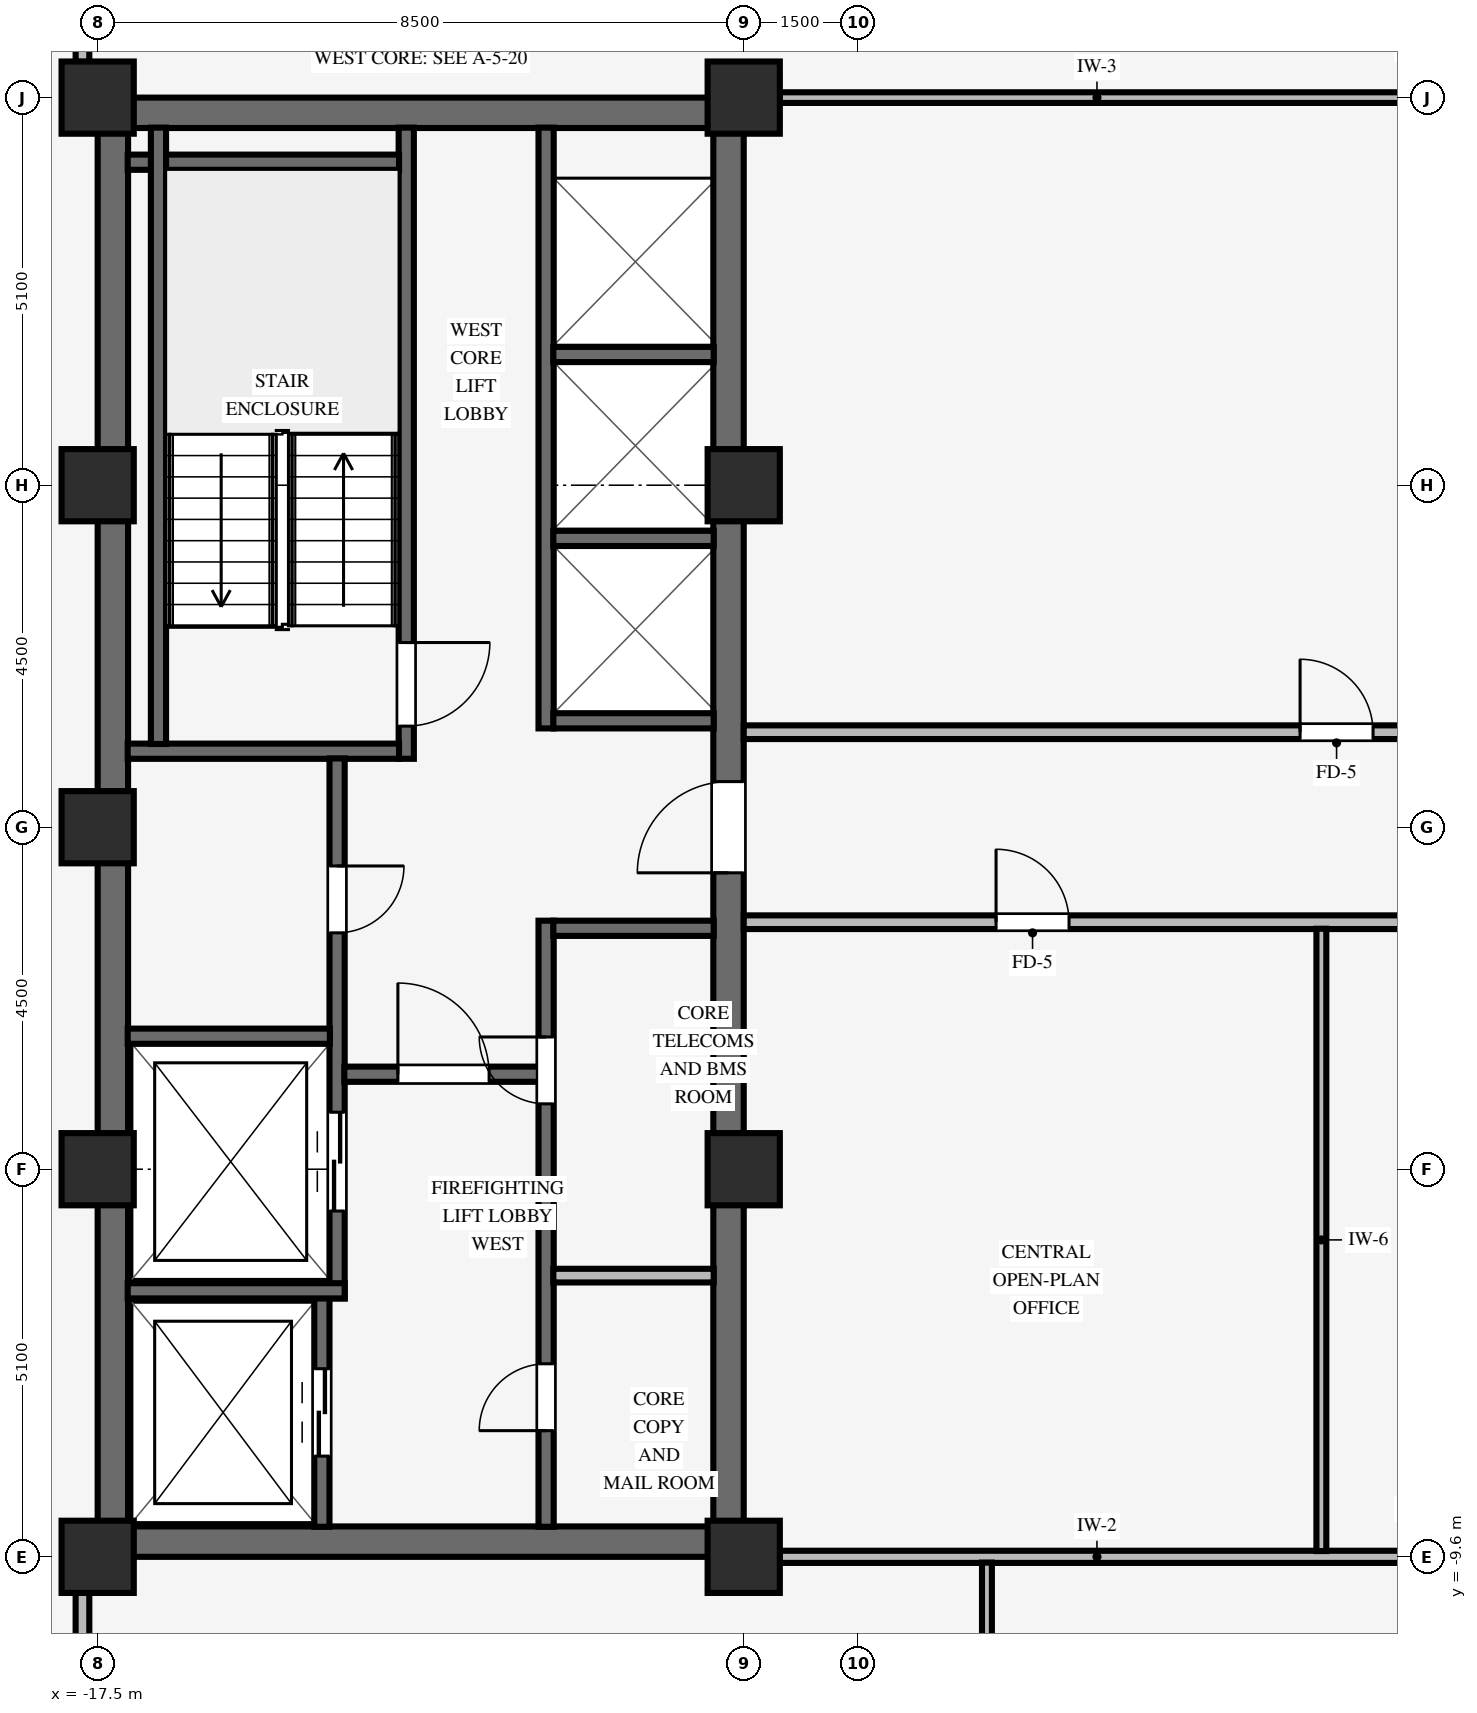
"""IFC4 building model, lengths in metres.
Left out: names, types, materials, properties, quantities, classifications, styles, units other than length and angle.
Written with IfcOpenShell. Run it as: python <this file> out.ifc"""

import sys

from ifc_helpers import new_model, si_unit, direction, frame, frame_2d, origin, origin_2d, place, context, subcontext, project, spatial, rectangle, extrude, source, transform, mapped, element, fill, save


model = new_model("IFC4")
c1 = context("Model", 3, precision=1e-05, world=origin(), true_north=direction((0.0, 1.0)))
c2 = subcontext(c1, "Body", "Model", "MODEL_VIEW")
j1 = project(units=[si_unit("LENGTHUNIT", "METRE"), si_unit("PLANEANGLEUNIT", "RADIAN")], contexts=[c1])
p1 = place(None, origin())
s1 = spatial("IfcSite", under=j1, at=p1, CompositionType="ELEMENT")
p2 = place(p1, origin())
s2 = spatial("IfcBuilding", under=s1, at=p2, CompositionType="ELEMENT")
p3 = place(p2, frame((0.0, 0.0, 149.4)))
s3 = spatial("IfcBuildingStorey", under=s2, at=p3, CompositionType="ELEMENT", Elevation=149.4)
for number, where, z_axis, x_axis in (
    (1, (-17.5, -9.4, 0.0), (0.0, 0.0, 1.0), (1.0, 0.0, 0.0)),
    (2, (-17.5, 9.4, 0.0), (0.0, 0.0, 1.0), (1.0, 0.0, 0.0)),
):
    element("IfcWall", number, at=place(p3, frame(where, z_axis=z_axis, x_axis=x_axis)), inside=s3, PredefinedType="SHEAR", context=c2, shape_type="SweptSolid", body=[
        extrude(rectangle(XDim=8.5, YDim=0.4, at=frame_2d((4.25, 0.0))), origin(), (0.0, 0.0, 1.0), 3.37),
    ])
p4 = place(p3, frame((-17.3, -9.205, 0.0), z_axis=(0.0, 0.0, 1.0), x_axis=(0.0, 1.0, 0.0)))
e3 = element("IfcWall", 3, at=p4, inside=s3, PredefinedType="SHEAR", context=c2, shape_type="SweptSolid", body=[
    extrude(rectangle(XDim=18.41, YDim=0.4, at=frame_2d((9.205, 0.0))), origin(), (0.0, 0.0, 1.0), 3.37),
])
p5 = place(p3, frame((-9.2, -9.205, 0.0), z_axis=(0.0, 0.0, 1.0), x_axis=(0.0, 1.0, 0.0)))
e4 = element("IfcWall", 4, at=p5, inside=s3, PredefinedType="SHEAR", context=c2, shape_type="SweptSolid", body=[
    extrude(rectangle(XDim=18.41, YDim=0.4, at=frame_2d((9.205, 0.0))), origin(), (0.0, 0.0, 1.0), 3.37),
])
p6 = place(p5, frame((8.605, 0.0, 0.0)))
e5 = element("IfcOpeningElement", 5, at=p6, cuts=e4, PredefinedType="OPENING", context=c2, shape_type="SweptSolid", body=[
    extrude(rectangle(XDim=1.2, YDim=2.15, at=frame_2d((0.6, 1.075))), frame((0.0, 0.21, 0.0), z_axis=(0.0, -1.0, 0.0), x_axis=(1.0, 0.0, 0.0)), (0.0, 0.0, 1.0), 0.42),
])
for number, where, z_axis, x_axis in (
    (6, (-17.5, -9.6, 0.0), (0.0, 0.0, 1.0), (1.0, 0.0, 0.0)),
    (7, (-17.5, -4.5, 0.0), (0.0, 0.0, 1.0), (1.0, 0.0, 0.0)),
    (8, (-17.5, 4.5, 0.0), (0.0, 0.0, 1.0), (1.0, 0.0, 0.0)),
    (9, (-17.5, 9.6, 0.0), (0.0, 0.0, 1.0), (1.0, 0.0, 0.0)),
    (10, (-9.0, -9.6, 0.0), (0.0, 0.0, 1.0), (1.0, 0.0, 0.0)),
    (11, (-9.0, -4.5, 0.0), (0.0, 0.0, 1.0), (1.0, 0.0, 0.0)),
    (12, (-9.0, 4.5, 0.0), (0.0, 0.0, 1.0), (1.0, 0.0, 0.0)),
    (13, (-9.0, 9.6, 0.0), (0.0, 0.0, 1.0), (1.0, 0.0, 0.0)),
    (14, (-17.5, 0.0, 0.0), (0.0, 0.0, 1.0), (1.0, 0.0, 0.0)),
):
    element("IfcColumn", number, at=place(p3, frame(where, z_axis=z_axis, x_axis=x_axis)), inside=s3, PredefinedType="COLUMN", context=c2, shape_type="SweptSolid", body=[
        extrude(rectangle(XDim=0.95, YDim=0.95, at=origin_2d()), origin(), (0.0, 0.0, 1.0), 3.37),
    ])
p7 = place(p3, frame((-13.44, 0.9, 0.0), z_axis=(0.0, 0.0, 1.0), x_axis=(0.0, 1.0, 0.0)))
e15 = element("IfcWall", 15, at=p7, inside=s3, PredefinedType="SHEAR", context=c2, shape_type="SweptSolid", body=[
    extrude(rectangle(XDim=8.305, YDim=0.2, at=frame_2d((4.153, 0.0))), origin(), (0.0, 0.0, 1.0), 3.37),
])
p8 = place(p7, frame((1.53, 0.0, 0.0), z_axis=(0.0, 0.0, 1.0), x_axis=(-1.0, 0.0, 0.0)))
e16 = element("IfcOpeningElement", 16, at=p8, cuts=e15, PredefinedType="OPENING", context=c2, shape_type="SweptSolid", body=[
    extrude(rectangle(XDim=1.1, YDim=2.15, at=frame_2d((0.55, 1.075))), frame((0.0, 0.11, 0.0), z_axis=(0.0, -1.0, 0.0), x_axis=(1.0, 0.0, 0.0)), (0.0, 0.0, 1.0), 0.22),
])
for number, where, z_axis, x_axis in (
    (17, (-17.105, 1.0, 0.0), (0.0, 0.0, 1.0), (1.0, 0.0, 0.0)),
    (18, (-17.105, 8.75, 0.0), (0.0, 0.0, 1.0), (1.0, 0.0, 0.0)),
):
    element("IfcWall", number, at=place(p3, frame(where, z_axis=z_axis, x_axis=x_axis)), inside=s3, PredefinedType="SHEAR", context=c2, shape_type="SweptSolid", body=[
        extrude(rectangle(XDim=3.57, YDim=0.2, at=frame_2d((1.785, 0.0))), origin(), (0.0, 0.0, 1.0), 3.37),
    ])
p9 = place(p3, frame((-16.7, 1.095, 0.0), z_axis=(0.0, 0.0, 1.0), x_axis=(0.0, 1.0, 0.0)))
e19 = element("IfcWall", 19, at=p9, inside=s3, PredefinedType="SHEAR", context=c2, shape_type="SweptSolid", body=[
    extrude(rectangle(XDim=8.11, YDim=0.2, at=frame_2d((4.055, 0.0))), origin(), (0.0, 0.0, 1.0), 3.37),
])
p10 = place(p3, frame((-14.55, -9.205, 0.0), z_axis=(0.0, 0.0, 1.0), x_axis=(0.0, 1.0, 0.0)))
e20 = element("IfcWall", 20, at=p10, inside=s3, PredefinedType="SHEAR", context=c2, shape_type="SweptSolid", body=[
    extrude(rectangle(XDim=3.01, YDim=0.2, at=frame_2d((1.505, 0.0))), origin(), (0.0, 0.0, 1.0), 3.37),
])
p11 = place(p10, frame((0.93, 0.0, 0.0)))
e21 = element("IfcOpeningElement", 21, at=p11, cuts=e20, PredefinedType="OPENING", context=c2, shape_type="SweptSolid", body=[
    extrude(rectangle(XDim=1.15, YDim=2.15, at=frame_2d((0.575, 1.075))), frame((0.0, 0.11, 0.0), z_axis=(0.0, -1.0, 0.0), x_axis=(1.0, 0.0, 0.0)), (0.0, 0.0, 1.0), 0.22),
])
p12 = place(p3, frame((-14.35, -6.2, 0.0), z_axis=(0.0, 0.0, 1.0), x_axis=(0.0, 1.0, 0.0)))
e22 = element("IfcWall", 22, at=p12, inside=s3, PredefinedType="SHEAR", context=c2, shape_type="SweptSolid", body=[
    extrude(rectangle(XDim=7.105, YDim=0.2, at=frame_2d((3.552, 0.0))), origin(), (0.0, 0.0, 1.0), 3.37),
])
p13 = place(p12, frame((5.69, 0.0, 0.0), z_axis=(0.0, 0.0, 1.0), x_axis=(-1.0, 0.0, 0.0)))
e23 = element("IfcOpeningElement", 23, at=p13, cuts=e22, PredefinedType="OPENING", context=c2, shape_type="SweptSolid", body=[
    extrude(rectangle(XDim=0.88, YDim=2.1, at=frame_2d((0.44, 1.05))), frame((0.0, 0.11, 0.0), z_axis=(0.0, -1.0, 0.0), x_axis=(1.0, 0.0, 0.0)), (0.0, 0.0, 1.0), 0.22),
])
p14 = place(p12, frame((1.15, 0.0, 0.0)))
e24 = element("IfcOpeningElement", 24, at=p14, cuts=e22, PredefinedType="OPENING", context=c2, shape_type="SweptSolid", body=[
    extrude(rectangle(XDim=1.3, YDim=2.2, at=frame_2d((0.65, 1.1))), frame((0.0, 0.11, 0.0), z_axis=(0.0, -1.0, 0.0), x_axis=(1.0, 0.0, 0.0)), (0.0, 0.0, 1.0), 0.22),
])
p15 = place(p3, frame((-17.105, -6.1, 0.0), z_axis=(0.0, 0.0, 1.0), x_axis=(1.0, 0.0, 0.0)))
e25 = element("IfcWall", 25, at=p15, inside=s3, PredefinedType="SHEAR", context=c2, shape_type="SweptSolid", body=[
    extrude(rectangle(XDim=2.855, YDim=0.2, at=frame_2d((1.427, 0.0))), origin(), (0.0, 0.0, 1.0), 3.37),
])
p16 = place(p3, frame((-17.105, -2.75, 0.0), z_axis=(0.0, 0.0, 1.0), x_axis=(1.0, 0.0, 0.0)))
e26 = element("IfcWall", 26, at=p16, inside=s3, PredefinedType="SHEAR", context=c2, shape_type="SweptSolid", body=[
    extrude(rectangle(XDim=2.66, YDim=0.2, at=frame_2d((1.33, 0.0))), origin(), (0.0, 0.0, 1.0), 3.37),
])
p17 = place(p3, frame((-11.6, -9.205, 0.0), z_axis=(0.0, 0.0, 1.0), x_axis=(0.0, 1.0, 0.0)))
e27 = element("IfcWall", 27, at=p17, inside=s3, PredefinedType="SHEAR", context=c2, shape_type="SweptSolid", body=[
    extrude(rectangle(XDim=7.975, YDim=0.2, at=frame_2d((3.988, 0.0))), origin(), (0.0, 0.0, 1.0), 3.37),
])
p18 = place(p17, frame((1.265, 0.0, 0.0)))
e28 = element("IfcOpeningElement", 28, at=p18, cuts=e27, PredefinedType="OPENING", context=c2, shape_type="SweptSolid", body=[
    extrude(rectangle(XDim=0.88, YDim=2.1, at=frame_2d((0.44, 1.05))), frame((0.0, 0.11, 0.0), z_axis=(0.0, -1.0, 0.0), x_axis=(1.0, 0.0, 0.0)), (0.0, 0.0, 1.0), 0.22),
])
p19 = place(p17, frame((5.565, 0.0, 0.0)))
e29 = element("IfcOpeningElement", 29, at=p19, cuts=e27, PredefinedType="OPENING", context=c2, shape_type="SweptSolid", body=[
    extrude(rectangle(XDim=0.88, YDim=2.1, at=frame_2d((0.44, 1.05))), frame((0.0, 0.11, 0.0), z_axis=(0.0, -1.0, 0.0), x_axis=(1.0, 0.0, 0.0)), (0.0, 0.0, 1.0), 0.22),
])
p20 = place(p3, frame((-14.255, -3.25, 0.0), z_axis=(0.0, 0.0, 1.0), x_axis=(1.0, 0.0, 0.0)))
e30 = element("IfcWall", 30, at=p20, inside=s3, PredefinedType="SHEAR", context=c2, shape_type="SweptSolid", body=[
    extrude(rectangle(XDim=2.56, YDim=0.2, at=frame_2d((1.28, 0.0))), origin(), (0.0, 0.0, 1.0), 3.37),
])
p21 = place(p20, frame((0.705, 0.0, 0.0)))
e31 = element("IfcOpeningElement", 31, at=p21, cuts=e30, PredefinedType="OPENING", context=c2, shape_type="SweptSolid", body=[
    extrude(rectangle(XDim=1.2, YDim=2.15, at=frame_2d((0.6, 1.075))), frame((0.0, 0.11, 0.0), z_axis=(0.0, -1.0, 0.0), x_axis=(1.0, 0.0, 0.0)), (0.0, 0.0, 1.0), 0.22),
])
p22 = place(p3, frame((-11.505, -1.33, 0.0), z_axis=(0.0, 0.0, 1.0), x_axis=(1.0, 0.0, 0.0)))
e32 = element("IfcWall", 32, at=p22, inside=s3, PredefinedType="SHEAR", context=c2, shape_type="SweptSolid", body=[
    extrude(rectangle(XDim=2.11, YDim=0.2, at=frame_2d((1.055, 0.0))), origin(), (0.0, 0.0, 1.0), 3.37),
])
p23 = place(p3, frame((-11.505, -5.9, 0.0), z_axis=(0.0, 0.0, 1.0), x_axis=(1.0, 0.0, 0.0)))
e33 = element("IfcWall", 33, at=p23, inside=s3, PredefinedType="PARTITIONING", context=c2, shape_type="SweptSolid", body=[
    extrude(rectangle(XDim=2.11, YDim=0.18, at=frame_2d((1.055, 0.0))), origin(), (0.0, 0.0, 1.0), 3.36),
])
p24 = place(p3, frame((-11.6, 1.3, 0.0), z_axis=(0.0, 0.0, 1.0), x_axis=(0.0, 1.0, 0.0)))
e34 = element("IfcWall", 34, at=p24, inside=s3, PredefinedType="SHEAR", context=c2, shape_type="SweptSolid", body=[
    extrude(rectangle(XDim=7.905, YDim=0.2, at=frame_2d((3.953, 0.0))), origin(), (0.0, 0.0, 1.0), 3.37),
])
for number, where, z_axis, x_axis in (
    (35, (-11.505, 1.4, 0.0), (0.0, 0.0, 1.0), (1.0, 0.0, 0.0)),
    (36, (-11.505, 3.8, 0.0), (0.0, 0.0, 1.0), (1.0, 0.0, 0.0)),
    (37, (-11.505, 6.22, 0.0), (0.0, 0.0, 1.0), (1.0, 0.0, 0.0)),
):
    element("IfcWall", number, at=place(p3, frame(where, z_axis=z_axis, x_axis=x_axis)), inside=s3, PredefinedType="SHEAR", context=c2, shape_type="SweptSolid", body=[
        extrude(rectangle(XDim=2.11, YDim=0.2, at=frame_2d((1.055, 0.0))), origin(), (0.0, 0.0, 1.0), 3.37),
    ])
p25 = place(p3, frame((-8.529, -9.6, 0.0), z_axis=(0.0, 0.0, 1.0), x_axis=(1.0, 0.0, 0.0)))
e38 = element("IfcWall", 38, at=p25, inside=s3, PredefinedType="PARTITIONING", context=c2, shape_type="SweptSolid", body=[
    extrude(rectangle(XDim=8.353, YDim=0.16, at=frame_2d((4.177, 0.0))), origin(), (0.0, 0.0, 1.0), 2.405),
])
p26 = place(p3, frame((-9.0, -1.25, 0.0), z_axis=(0.0, 0.0, 1.0), x_axis=(1.0, 0.0, 0.0)))
e39 = element("IfcWall", 39, at=p26, inside=s3, PredefinedType="PARTITIONING", context=c2, shape_type="SweptSolid", body=[
    extrude(rectangle(XDim=15.6, YDim=0.18, at=frame_2d((7.8, 0.0))), origin(), (0.0, 0.0, 1.0), 3.36),
])
p27 = place(p26, frame((3.32, 0.0, 0.0)))
e40 = element("IfcOpeningElement", 40, at=p27, cuts=e39, PredefinedType="OPENING", context=c2, shape_type="SweptSolid", body=[
    extrude(rectangle(XDim=0.96, YDim=2.1, at=frame_2d((0.48, 1.05))), frame((0.0, 0.1, 0.0), z_axis=(0.0, -1.0, 0.0), x_axis=(1.0, 0.0, 0.0)), (0.0, 0.0, 1.0), 0.2),
])
p28 = place(p3, frame((-9.0, 1.25, 0.0), z_axis=(0.0, 0.0, 1.0), x_axis=(1.0, 0.0, 0.0)))
e41 = element("IfcWall", 41, at=p28, inside=s3, PredefinedType="PARTITIONING", context=c2, shape_type="SweptSolid", body=[
    extrude(rectangle(XDim=15.6, YDim=0.18, at=frame_2d((7.8, 0.0))), origin(), (0.0, 0.0, 1.0), 3.36),
])
p29 = place(p28, frame((7.32, 0.0, 0.0)))
e42 = element("IfcOpeningElement", 42, at=p29, cuts=e41, PredefinedType="OPENING", context=c2, shape_type="SweptSolid", body=[
    extrude(rectangle(XDim=0.96, YDim=2.1, at=frame_2d((0.48, 1.05))), frame((0.0, 0.1, 0.0), z_axis=(0.0, -1.0, 0.0), x_axis=(1.0, 0.0, 0.0)), (0.0, 0.0, 1.0), 0.2),
])
p30 = place(p3, frame((-8.529, 9.6, 0.0), z_axis=(0.0, 0.0, 1.0), x_axis=(1.0, 0.0, 0.0)))
e43 = element("IfcWall", 43, at=p30, inside=s3, PredefinedType="PARTITIONING", context=c2, shape_type="SweptSolid", body=[
    extrude(rectangle(XDim=8.353, YDim=0.14, at=frame_2d((4.177, 0.0))), origin(), (0.0, 0.0, 1.0), 2.405),
])
for number, where, z_axis, x_axis in (
    (44, (-17.7, -13.414, 0.0), (0.0, 0.0, 1.0), (0.0, 1.0, 0.0)),
    (45, (-17.7, 10.071, 0.0), (0.0, 0.0, 1.0), (0.0, 1.0, 0.0)),
):
    element("IfcWall", number, at=place(p3, frame(where, z_axis=z_axis, x_axis=x_axis)), inside=s3, PredefinedType="PARTITIONING", context=c2, shape_type="SweptSolid", body=[
        extrude(rectangle(XDim=3.343, YDim=0.18, at=frame_2d((1.671, 0.0))), origin(), (0.0, 0.0, 1.0), 2.816),
    ])
p31 = place(p3, frame((-5.8, -13.414, 0.0), z_axis=(0.0, 0.0, 1.0), x_axis=(0.0, 1.0, 0.0)))
e46 = element("IfcWall", 46, at=p31, inside=s3, PredefinedType="PARTITIONING", context=c2, shape_type="SweptSolid", body=[
    extrude(rectangle(XDim=3.738, YDim=0.13, at=frame_2d((1.869, 0.0))), origin(), (0.0, 0.0, 1.0), 3.36),
])
p32 = place(p3, frame((-1.4, -9.524, 0.0), z_axis=(0.0, 0.0, 1.0), x_axis=(0.0, 1.0, 0.0)))
e47 = element("IfcWall", 47, at=p32, inside=s3, PredefinedType="PARTITIONING", context=c2, shape_type="SweptSolid", body=[
    extrude(rectangle(XDim=8.188, YDim=0.13, at=frame_2d((4.094, 0.0))), origin(), (0.0, 0.0, 1.0), 3.36),
])
m1 = source(origin(), c2, "Body", "SweptSolid", [
    extrude(rectangle(XDim=1.1, YDim=2.15, at=frame_2d((0.55, 1.075))), frame((0.0, 0.025, 0.0), z_axis=(0.0, -1.0, 0.0), x_axis=(1.0, 0.0, 0.0)), (0.0, 0.0, 1.0), 0.05),
])
p33 = place(p8, origin())
e48 = element("IfcDoor", 48, at=p33, inside=s3, OperationType="SINGLE_SWING_LEFT", PredefinedType="DOOR", context=c2, shape_type="MappedRepresentation", body=[
    mapped(m1, transform((0.0, 0.0, 0.0), scale=1.0)),
])
fill(e16, e48)
m2 = source(origin(), c2, "Body", "SweptSolid", [
    extrude(rectangle(XDim=0.88, YDim=2.1, at=frame_2d((0.44, 1.05))), frame((0.0, 0.025, 0.0), z_axis=(0.0, -1.0, 0.0), x_axis=(1.0, 0.0, 0.0)), (0.0, 0.0, 1.0), 0.05),
])
p34 = place(p13, origin())
e49 = element("IfcDoor", 49, at=p34, inside=s3, OperationType="SINGLE_SWING_LEFT", PredefinedType="DOOR", context=c2, shape_type="MappedRepresentation", body=[
    mapped(m2, transform((0.0, 0.0, 0.0), scale=1.0)),
])
fill(e23, e49)
m3 = source(origin(), c2, "Body", "SweptSolid", [
    extrude(rectangle(XDim=1.2, YDim=2.15, at=frame_2d((0.6, 1.075))), frame((0.0, 0.025, 0.0), z_axis=(0.0, -1.0, 0.0), x_axis=(1.0, 0.0, 0.0)), (0.0, 0.0, 1.0), 0.05),
])
p35 = place(p21, origin())
e50 = element("IfcDoor", 50, at=p35, inside=s3, OperationType="SINGLE_SWING_LEFT", PredefinedType="DOOR", context=c2, shape_type="MappedRepresentation", body=[
    mapped(m3, transform((0.0, 0.0, 0.0), scale=1.0)),
])
fill(e31, e50)
p36 = place(p18, origin())
e51 = element("IfcDoor", 51, at=p36, inside=s3, OperationType="SINGLE_SWING_LEFT", PredefinedType="DOOR", context=c2, shape_type="MappedRepresentation", body=[
    mapped(m2, transform((0.0, 0.0, 0.0), scale=1.0)),
])
fill(e28, e51)
p37 = place(p19, origin())
e52 = element("IfcDoor", 52, at=p37, inside=s3, OperationType="SINGLE_SWING_RIGHT", PredefinedType="DOOR", context=c2, shape_type="MappedRepresentation", body=[
    mapped(m2, transform((0.0, 0.0, 0.0), scale=1.0)),
])
fill(e29, e52)
p38 = place(p6, origin())
e53 = element("IfcDoor", 53, at=p38, inside=s3, OperationType="SINGLE_SWING_LEFT", PredefinedType="DOOR", context=c2, shape_type="MappedRepresentation", body=[
    mapped(m3, transform((0.0, 0.0, 0.0), scale=1.0)),
])
fill(e5, e53)
m4 = source(origin(), c2, "Body", "SweptSolid", [
    extrude(rectangle(XDim=1.15, YDim=2.15, at=frame_2d((0.575, 1.075))), frame((0.0, 0.025, 0.0), z_axis=(0.0, -1.0, 0.0), x_axis=(1.0, 0.0, 0.0)), (0.0, 0.0, 1.0), 0.05),
])
p39 = place(p11, origin())
e54 = element("IfcDoor", 54, at=p39, inside=s3, OperationType="DOUBLE_DOOR_SLIDING", PredefinedType="DOOR", context=c2, shape_type="MappedRepresentation", body=[
    mapped(m4, transform((0.0, 0.0, 0.0), scale=1.0)),
])
fill(e21, e54)
m5 = source(origin(), c2, "Body", "SweptSolid", [
    extrude(rectangle(XDim=1.3, YDim=2.2, at=frame_2d((0.65, 1.1))), frame((0.0, 0.025, 0.0), z_axis=(0.0, -1.0, 0.0), x_axis=(1.0, 0.0, 0.0)), (0.0, 0.0, 1.0), 0.05),
])
p40 = place(p14, origin())
e55 = element("IfcDoor", 55, at=p40, inside=s3, OperationType="DOUBLE_DOOR_SLIDING", PredefinedType="DOOR", context=c2, shape_type="MappedRepresentation", body=[
    mapped(m5, transform((0.0, 0.0, 0.0), scale=1.0)),
])
fill(e24, e55)
m6 = source(origin(), c2, "Body", "SweptSolid", [
    extrude(rectangle(XDim=0.96, YDim=2.1, at=frame_2d((0.48, 1.05))), frame((0.0, 0.025, 0.0), z_axis=(0.0, -1.0, 0.0), x_axis=(1.0, 0.0, 0.0)), (0.0, 0.0, 1.0), 0.05),
])
p41 = place(p29, origin())
e56 = element("IfcDoor", 56, at=p41, inside=s3, OperationType="SINGLE_SWING_LEFT", PredefinedType="DOOR", context=c2, shape_type="MappedRepresentation", body=[
    mapped(m6, transform((0.0, 0.0, 0.0), scale=1.0)),
])
fill(e42, e56)
p42 = place(p27, origin())
e57 = element("IfcDoor", 57, at=p42, inside=s3, OperationType="SINGLE_SWING_LEFT", PredefinedType="DOOR", context=c2, shape_type="MappedRepresentation", body=[
    mapped(m6, transform((0.0, 0.0, 0.0), scale=1.0)),
])
fill(e40, e57)
save(model, sys.argv[1])
